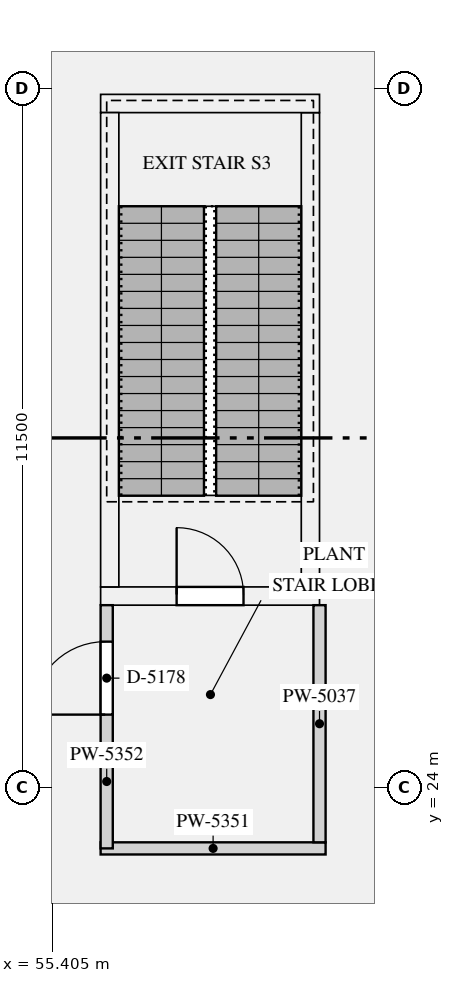
"""IFC4 building model, lengths in metres.
Left out: names, types, materials, properties, quantities, classifications, styles, units other than length and angle.
Written with IfcOpenShell. Run it as: python <this file> out.ifc"""

import sys

from ifc_helpers import new_model, si_unit, direction, frame, frame_2d, origin, place, context, subcontext, project, spatial, rectangle, extrude, element, fill, save


model = new_model("IFC4")
c1 = context("Model", 3, precision=1e-05, world=origin(), true_north=direction((0.0, 1.0)))
c2 = subcontext(c1, "Body", "Model", "MODEL_VIEW")
j1 = project(units=[si_unit("LENGTHUNIT", "METRE"), si_unit("PLANEANGLEUNIT", "RADIAN")], contexts=[c1])
p1 = place(None, origin())
s1 = spatial("IfcSite", under=j1, at=p1, CompositionType="ELEMENT")
p2 = place(p1, origin())
s2 = spatial("IfcBuilding", under=s1, at=p2, CompositionType="ELEMENT")
p3 = place(p2, frame((0.0, 0.0, 130.8)))
s3 = spatial("IfcBuildingStorey", under=s2, at=p3, CompositionType="ELEMENT", Elevation=130.8)
p4 = place(p3, frame((56.2, 27.15, 0.0), z_axis=(0.0, 0.0, 1.0), x_axis=(1.0, 0.0, 0.0)))
e1 = element("IfcWall", 1, at=p4, inside=s3, PredefinedType="SHEAR", context=c2, shape_type="SweptSolid", body=[
    extrude(rectangle(XDim=3.6, YDim=0.3, at=frame_2d((1.8, 0.0))), origin(), (0.0, 0.0, 1.0), 6.3),
])
p5 = place(p4, frame((1.25, 0.0, 0.0)))
e2 = element("IfcOpeningElement", 2, at=p5, cuts=e1, PredefinedType="OPENING", context=c2, shape_type="SweptSolid", body=[
    extrude(rectangle(XDim=1.1, YDim=2.1, at=frame_2d((0.55, 1.05))), frame((0.0, 0.16, 0.0), z_axis=(0.0, -1.0, 0.0), x_axis=(1.0, 0.0, 0.0)), (0.0, 0.0, 1.0), 0.32),
])
p6 = place(p3, frame((56.2, 35.25, 0.0), z_axis=(0.0, 0.0, 1.0), x_axis=(1.0, 0.0, 0.0)))
e3 = element("IfcWall", 3, at=p6, inside=s3, PredefinedType="SHEAR", context=c2, shape_type="SweptSolid", body=[
    extrude(rectangle(XDim=3.6, YDim=0.3, at=frame_2d((1.8, 0.0))), origin(), (0.0, 0.0, 1.0), 6.3),
])
for number, where, z_axis, x_axis in (
    (4, (56.35, 27.3, 0.0), (0.0, 0.0, 1.0), (0.0, 1.0, 0.0)),
    (5, (59.65, 27.3, 0.0), (0.0, 0.0, 1.0), (0.0, 1.0, 0.0)),
):
    element("IfcWall", number, at=place(p3, frame(where, z_axis=z_axis, x_axis=x_axis)), inside=s3, PredefinedType="SHEAR", context=c2, shape_type="SweptSolid", body=[
        extrude(rectangle(XDim=7.8, YDim=0.3, at=frame_2d((3.9, 0.0))), origin(), (0.0, 0.0, 1.0), 6.3),
    ])
p7 = place(p3, frame((56.2, 23.0, 0.0), z_axis=(0.0, 0.0, 1.0), x_axis=(1.0, 0.0, 0.0)))
e6 = element("IfcWall", 6, at=p7, inside=s3, PredefinedType="PARTITIONING", context=c2, shape_type="SweptSolid", body=[
    extrude(rectangle(XDim=3.7, YDim=0.2, at=frame_2d((1.85, 0.0))), origin(), (0.0, 0.0, 1.0), 5.8),
])
p8 = place(p3, frame((56.3, 23.0, 0.0), z_axis=(0.0, 0.0, 1.0), x_axis=(0.0, 1.0, 0.0)))
e7 = element("IfcWall", 7, at=p8, inside=s3, PredefinedType="PARTITIONING", context=c2, shape_type="SweptSolid", body=[
    extrude(rectangle(XDim=4.0, YDim=0.2, at=frame_2d((2.0, 0.0))), origin(), (0.0, 0.0, 1.0), 5.8),
])
p9 = place(p8, frame((2.2, 0.0, 0.0)))
e8 = element("IfcOpeningElement", 8, at=p9, cuts=e7, PredefinedType="OPENING", context=c2, shape_type="SweptSolid", body=[
    extrude(rectangle(XDim=1.2, YDim=2.1, at=frame_2d((0.6, 1.05))), frame((0.0, 0.11, 0.0), z_axis=(0.0, -1.0, 0.0), x_axis=(1.0, 0.0, 0.0)), (0.0, 0.0, 1.0), 0.22),
])
p10 = place(p3, frame((59.8, 23.1, 0.0), z_axis=(0.0, 0.0, 1.0), x_axis=(0.0, 1.0, 0.0)))
e9 = element("IfcWall", 9, at=p10, inside=s3, PredefinedType="PARTITIONING", context=c2, shape_type="SweptSolid", body=[
    extrude(rectangle(XDim=3.9, YDim=0.2, at=frame_2d((1.95, 0.0))), origin(), (0.0, 0.0, 1.0), 5.8),
])
p11 = place(p5, origin())
e10 = element("IfcDoor", 10, at=p11, inside=s3, OperationType="SINGLE_SWING_LEFT", PredefinedType="DOOR", context=c2, shape_type="SweptSolid", body=[
    extrude(rectangle(XDim=1.1, YDim=2.1, at=frame_2d((0.55, 1.05))), frame((0.0, 0.025, 0.0), z_axis=(0.0, -1.0, 0.0), x_axis=(1.0, 0.0, 0.0)), (0.0, 0.0, 1.0), 0.05),
])
fill(e2, e10)
p12 = place(p9, origin())
e11 = element("IfcDoor", 11, at=p12, inside=s3, OperationType="SINGLE_SWING_LEFT", PredefinedType="DOOR", context=c2, shape_type="SweptSolid", body=[
    extrude(rectangle(XDim=1.2, YDim=2.1, at=frame_2d((0.6, 1.05))), frame((0.0, 0.025, 0.0), z_axis=(0.0, -1.0, 0.0), x_axis=(1.0, 0.0, 0.0)), (0.0, 0.0, 1.0), 0.05),
])
fill(e8, e11)
save(model, sys.argv[1])
